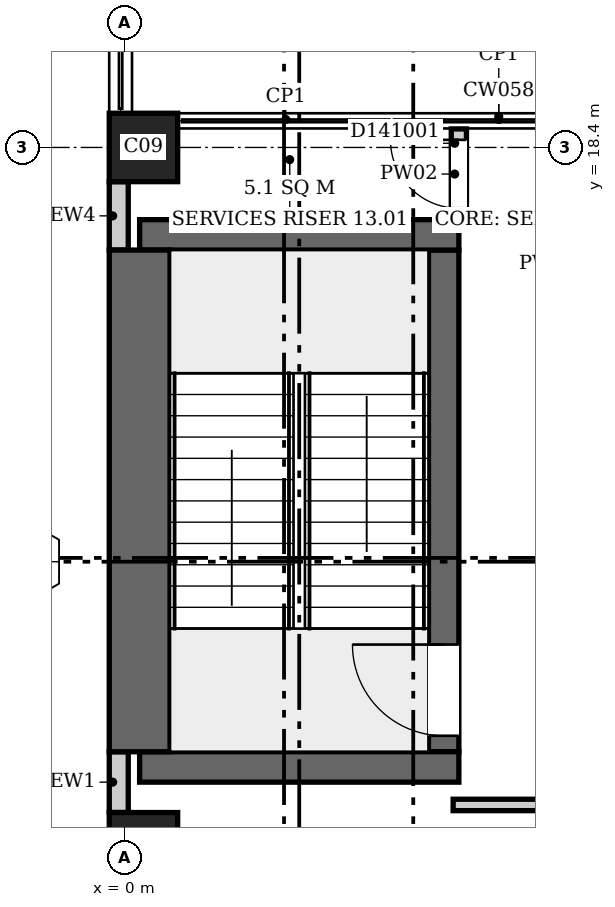
"""IFC4 building model, lengths in metres.
Left out: names, types, materials, properties, quantities, classifications, styles, units other than length and angle.
Written with IfcOpenShell. Run it as: python <this file> out.ifc"""

import sys

from ifc_helpers import new_model, si_unit, direction, frame, frame_2d, origin, origin_2d, place, context, subcontext, project, spatial, rectangle, extrude, element, fill, save


model = new_model("IFC4")
c1 = context("Model", 3, precision=1e-05, world=origin(), true_north=direction((0.0, 1.0)))
c2 = subcontext(c1, "Body", "Model", "MODEL_VIEW")
j1 = project(units=[si_unit("LENGTHUNIT", "METRE"), si_unit("PLANEANGLEUNIT", "RADIAN")], contexts=[c1])
p1 = place(None, origin())
s1 = spatial("IfcSite", under=j1, at=p1, CompositionType="ELEMENT")
p2 = place(p1, origin())
s2 = spatial("IfcBuilding", under=s1, at=p2, CompositionType="ELEMENT")
p3 = place(p2, frame((0.0, 0.0, 65.5)))
s3 = spatial("IfcBuildingStorey", under=s2, at=p3, CompositionType="ELEMENT", Elevation=65.5)
for number, where, z_axis, x_axis in (
    (1, (0.2, 10.25, 0.0), (0.0, 0.0, 1.0), (1.0, 0.0, 0.0)),
    (2, (0.2, 17.25, 0.0), (0.0, 0.0, 1.0), (1.0, 0.0, 0.0)),
):
    element("IfcWall", number, at=place(p3, frame(where, z_axis=z_axis, x_axis=x_axis)), inside=s3, PredefinedType="SHEAR", context=c2, shape_type="SweptSolid", body=[
        extrude(rectangle(XDim=4.2, YDim=0.4, at=frame_2d((2.1, 0.0))), origin(), (0.0, 0.0, 1.0), 4.2),
    ])
p4 = place(p3, frame((0.2, 10.45, 0.0), z_axis=(0.0, 0.0, 1.0), x_axis=(0.0, 1.0, 0.0)))
e3 = element("IfcWall", 3, at=p4, inside=s3, PredefinedType="SHEAR", context=c2, shape_type="SweptSolid", body=[
    extrude(rectangle(XDim=6.6, YDim=0.8, at=frame_2d((3.3, 0.0))), origin(), (0.0, 0.0, 1.0), 4.2),
])
p5 = place(p3, frame((4.2, 10.45, 0.0), z_axis=(0.0, 0.0, 1.0), x_axis=(0.0, 1.0, 0.0)))
e4 = element("IfcWall", 4, at=p5, inside=s3, PredefinedType="SHEAR", context=c2, shape_type="SweptSolid", body=[
    extrude(rectangle(XDim=6.6, YDim=0.4, at=frame_2d((3.3, 0.0))), origin(), (0.0, 0.0, 1.0), 4.2),
])
p6 = place(p5, frame((0.21, 0.0, 0.0)))
e5 = element("IfcOpeningElement", 5, at=p6, cuts=e4, PredefinedType="OPENING", context=c2, shape_type="SweptSolid", body=[
    extrude(rectangle(XDim=1.2, YDim=2.1, at=frame_2d((0.6, 1.05))), frame((0.0, 0.21, 0.0), z_axis=(0.0, -1.0, 0.0), x_axis=(1.0, 0.0, 0.0)), (0.0, 0.0, 1.0), 0.42),
])
for number, where, z_axis, x_axis in (
    (6, (0.25, 9.2, 0.0), (0.0, 0.0, 1.0), (1.0, 0.0, 0.0)),
    (7, (0.25, 18.4, 0.0), (0.0, 0.0, 1.0), (1.0, 0.0, 0.0)),
):
    element("IfcColumn", number, at=place(p3, frame(where, z_axis=z_axis, x_axis=x_axis)), inside=s3, PredefinedType="COLUMN", context=c2, shape_type="SweptSolid", body=[
        extrude(rectangle(XDim=0.9, YDim=0.9, at=origin_2d()), origin(), (0.0, 0.0, 1.0), 4.2),
    ])
p7 = place(p3, frame((-0.074, 10.45, 0.0), z_axis=(0.0, 0.0, 1.0), x_axis=(0.0, -1.0, 0.0)))
e8 = element("IfcWall", 8, at=p7, inside=s3, PredefinedType="ELEMENTEDWALL", context=c2, shape_type="SweptSolid", body=[
    extrude(rectangle(XDim=0.8, YDim=0.25, at=frame_2d((0.4, 0.0))), origin(), (0.0, 0.0, 1.0), 3.9),
])
p8 = place(p3, frame((-0.074, 17.95, 0.0), z_axis=(0.0, 0.0, 1.0), x_axis=(0.0, -1.0, 0.0)))
e9 = element("IfcWall", 9, at=p8, inside=s3, PredefinedType="ELEMENTEDWALL", context=c2, shape_type="SweptSolid", body=[
    extrude(rectangle(XDim=0.9, YDim=0.25, at=frame_2d((0.45, 0.0))), origin(), (0.0, 0.0, 1.0), 3.9),
])
p9 = place(p3, frame((4.4, 17.456, 0.0), z_axis=(0.0, 0.0, 1.0), x_axis=(0.0, 1.0, 0.0)))
e10 = element("IfcWall", 10, at=p9, inside=s3, PredefinedType="PARTITIONING", context=c2, shape_type="SweptSolid", body=[
    extrude(rectangle(XDim=1.188, YDim=0.2, at=frame_2d((0.594, 0.0))), origin(), (0.0, 0.0, 1.0), 3.9),
])
p10 = place(p9, frame((0.144, 0.0, 0.0)))
e11 = element("IfcOpeningElement", 11, at=p10, cuts=e10, PredefinedType="OPENING", context=c2, shape_type="SweptSolid", body=[
    extrude(rectangle(XDim=0.9, YDim=2.1, at=frame_2d((0.45, 1.05))), frame((0.0, 0.11, 0.0), z_axis=(0.0, -1.0, 0.0), x_axis=(1.0, 0.0, 0.0)), (0.0, 0.0, 1.0), 0.22),
])
p11 = place(p3, frame((4.325, 9.75, 0.0), z_axis=(0.0, 0.0, 1.0), x_axis=(1.0, 0.0, 0.0)))
e12 = element("IfcWall", 12, at=p11, inside=s3, PredefinedType="PARTITIONING", context=c2, shape_type="SweptSolid", body=[
    extrude(rectangle(XDim=43.869, YDim=0.15, at=frame_2d((21.935, 0.0))), origin(), (0.0, 0.0, 1.0), 3.9),
])
p12 = place(p11, frame((6.575, 0.0, 0.0)))
e13 = element("IfcOpeningElement", 13, at=p12, cuts=e12, PredefinedType="OPENING", context=c2, shape_type="SweptSolid", body=[
    extrude(rectangle(XDim=1.8, YDim=2.1, at=frame_2d((0.9, 1.05))), frame((0.0, 0.085, 0.0), z_axis=(0.0, -1.0, 0.0), x_axis=(1.0, 0.0, 0.0)), (0.0, 0.0, 1.0), 0.17),
])
p13 = place(p11, frame((21.175, 0.0, 0.0)))
e14 = element("IfcOpeningElement", 14, at=p13, cuts=e12, PredefinedType="OPENING", context=c2, shape_type="SweptSolid", body=[
    extrude(rectangle(XDim=1.8, YDim=2.1, at=frame_2d((0.9, 1.05))), frame((0.0, 0.085, 0.0), z_axis=(0.0, -1.0, 0.0), x_axis=(1.0, 0.0, 0.0)), (0.0, 0.0, 1.0), 0.17),
])
p14 = place(p11, frame((36.075, 0.0, 0.0)))
e15 = element("IfcOpeningElement", 15, at=p14, cuts=e12, PredefinedType="OPENING", context=c2, shape_type="SweptSolid", body=[
    extrude(rectangle(XDim=1.0, YDim=2.1, at=frame_2d((0.5, 1.05))), frame((0.0, 0.085, 0.0), z_axis=(0.0, -1.0, 0.0), x_axis=(1.0, 0.0, 0.0)), (0.0, 0.0, 1.0), 0.17),
])
p15 = place(p6, origin())
e16 = element("IfcDoor", 16, at=p15, inside=s3, OperationType="SINGLE_SWING_RIGHT", PredefinedType="DOOR", context=c2, shape_type="SweptSolid", body=[
    extrude(rectangle(XDim=1.2, YDim=2.1, at=frame_2d((0.6, 1.05))), frame((0.0, 0.025, 0.0), z_axis=(0.0, -1.0, 0.0), x_axis=(1.0, 0.0, 0.0)), (0.0, 0.0, 1.0), 0.05),
])
fill(e5, e16)
p16 = place(p10, origin())
e17 = element("IfcDoor", 17, at=p16, inside=s3, OperationType="SINGLE_SWING_LEFT", PredefinedType="DOOR", context=c2, shape_type="SweptSolid", body=[
    extrude(rectangle(XDim=0.9, YDim=2.1, at=frame_2d((0.45, 1.05))), frame((0.0, 0.025, 0.0), z_axis=(0.0, -1.0, 0.0), x_axis=(1.0, 0.0, 0.0)), (0.0, 0.0, 1.0), 0.05),
])
fill(e11, e17)
save(model, sys.argv[1])
